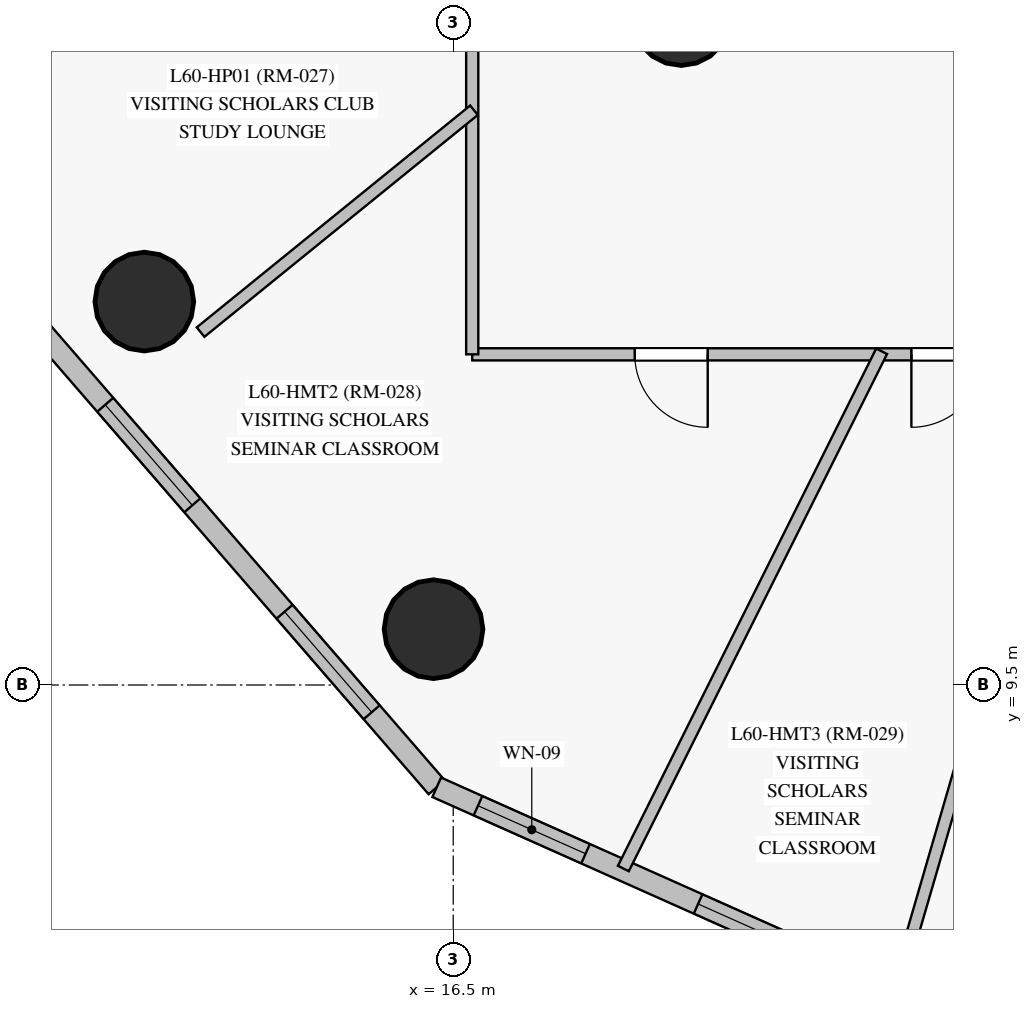
"""IFC4 building model, lengths in metres.
Left out: names, types, materials, properties, quantities, classifications, styles, units other than length and angle.
Written with IfcOpenShell. Run it as: python <this file> out.ifc"""

import sys

from ifc_helpers import new_model, si_unit, direction, frame, frame_2d, origin, origin_with_axes, origin_2d, place, context, subcontext, project, spatial, rectangle, circle, extrude, source, transform, mapped, element, fill, save


model = new_model("IFC4")
c1 = context("Model", 3, precision=1e-05, world=origin(), true_north=direction((0.0, 1.0)))
c2 = subcontext(c1, "Body", "Model", "MODEL_VIEW")
j1 = project(units=[si_unit("LENGTHUNIT", "METRE"), si_unit("PLANEANGLEUNIT", "RADIAN")], contexts=[c1])
p1 = place(None, origin())
s1 = spatial("IfcSite", under=j1, at=p1, CompositionType="ELEMENT")
p2 = place(p1, origin())
s2 = spatial("IfcBuilding", under=s1, at=p2, CompositionType="ELEMENT")
p3 = place(p2, frame((0.0, 0.0, 205.35)))
s3 = spatial("IfcBuildingStorey", under=s2, at=p3, CompositionType="ELEMENT", Elevation=205.35)
m1 = source(origin_with_axes(), c2, "Body", "SweptSolid", [
    extrude(circle(Radius=0.65, at=origin_2d()), origin(), (0.0, 0.0, 1.0), 3.05),
])
for number, where, z_axis, x_axis in (
    (1, (19.5, 18.3, 0.0), (0.0, 0.0, 1.0), (1.0, 0.0, 0.0)),
    (2, (12.436, 14.544, 0.0), (0.0, 0.0, 1.0), (1.0, 0.0, 0.0)),
    (3, (16.241, 10.234, 0.0), (0.0, 0.0, 1.0), (1.0, 0.0, 0.0)),
):
    element("IfcColumn", number, at=place(p3, frame(where, z_axis=z_axis, x_axis=x_axis)), inside=s3, PredefinedType="COLUMN", context=c2, shape_type="MappedRepresentation", body=[
        mapped(m1, transform((0.0, 0.0, 0.0), scale=1.0)),
    ])
p4 = place(p3, frame((7.413, 18.389, 0.0), z_axis=(0.0, 0.0, 1.0), x_axis=(0.654908577936, -0.755708114648, 0.0)))
e4 = element("IfcWall", 4, at=p4, inside=s3, PredefinedType="SOLIDWALL", context=c2, shape_type="SweptSolid", body=[
    extrude(rectangle(XDim=13.544, YDim=0.28, at=frame_2d((6.772, 0.0))), origin(), (0.0, 0.0, 1.0), 2.775),
])
p5 = place(p4, frame((0.573, 0.0, 0.85)))
e5 = element("IfcOpeningElement", 5, at=p5, cuts=e4, PredefinedType="OPENING", context=c2, shape_type="SweptSolid", body=[
    extrude(rectangle(XDim=0.95, YDim=1.5, at=frame_2d((0.475, 0.75))), frame((0.0, 0.15, 0.0), z_axis=(0.0, -1.0, 0.0), x_axis=(1.0, 0.0, 0.0)), (0.0, 0.0, 1.0), 0.3),
])
p6 = place(p4, frame((3.282, 0.0, 0.85)))
e6 = element("IfcOpeningElement", 6, at=p6, cuts=e4, PredefinedType="OPENING", context=c2, shape_type="SweptSolid", body=[
    extrude(rectangle(XDim=1.75, YDim=1.65, at=frame_2d((0.875, 0.825))), frame((0.0, 0.15, 0.0), z_axis=(0.0, -1.0, 0.0), x_axis=(1.0, 0.0, 0.0)), (0.0, 0.0, 1.0), 0.3),
])
p7 = place(p4, frame((6.885, 0.0, 0.85)))
e7 = element("IfcOpeningElement", 7, at=p7, cuts=e4, PredefinedType="OPENING", context=c2, shape_type="SweptSolid", body=[
    extrude(rectangle(XDim=1.75, YDim=1.65, at=frame_2d((0.875, 0.825))), frame((0.0, 0.15, 0.0), z_axis=(0.0, -1.0, 0.0), x_axis=(1.0, 0.0, 0.0)), (0.0, 0.0, 1.0), 0.3),
])
p8 = place(p4, frame((10.488, 0.0, 0.85)))
e8 = element("IfcOpeningElement", 8, at=p8, cuts=e4, PredefinedType="OPENING", context=c2, shape_type="SweptSolid", body=[
    extrude(rectangle(XDim=1.75, YDim=1.65, at=frame_2d((0.875, 0.825))), frame((0.0, 0.15, 0.0), z_axis=(0.0, -1.0, 0.0), x_axis=(1.0, 0.0, 0.0)), (0.0, 0.0, 1.0), 0.3),
])
p9 = place(p3, frame((16.283, 8.154, 0.0), z_axis=(0.0, 0.0, 1.0), x_axis=(0.913170676177, -0.407577374459, 0.0)))
e9 = element("IfcWall", 9, at=p9, inside=s3, PredefinedType="SOLIDWALL", context=c2, shape_type="SweptSolid", body=[
    extrude(rectangle(XDim=9.946, YDim=0.28, at=frame_2d((4.973, 0.0))), origin(), (0.0, 0.0, 1.0), 2.775),
])
p10 = place(p9, frame((0.594, 0.0, 0.85)))
e10 = element("IfcOpeningElement", 10, at=p10, cuts=e9, PredefinedType="OPENING", context=c2, shape_type="SweptSolid", body=[
    extrude(rectangle(XDim=1.55, YDim=1.65, at=frame_2d((0.775, 0.825))), frame((0.0, 0.15, 0.0), z_axis=(0.0, -1.0, 0.0), x_axis=(1.0, 0.0, 0.0)), (0.0, 0.0, 1.0), 0.3),
])
p11 = place(p9, frame((3.766, 0.0, 0.85)))
e11 = element("IfcOpeningElement", 11, at=p11, cuts=e9, PredefinedType="OPENING", context=c2, shape_type="SweptSolid", body=[
    extrude(rectangle(XDim=1.75, YDim=1.65, at=frame_2d((0.875, 0.825))), frame((0.0, 0.15, 0.0), z_axis=(0.0, -1.0, 0.0), x_axis=(1.0, 0.0, 0.0)), (0.0, 0.0, 1.0), 0.3),
])
p12 = place(p9, frame((7.369, 0.0, 0.85)))
e12 = element("IfcOpeningElement", 12, at=p12, cuts=e9, PredefinedType="OPENING", context=c2, shape_type="SweptSolid", body=[
    extrude(rectangle(XDim=1.75, YDim=1.65, at=frame_2d((0.875, 0.825))), frame((0.0, 0.15, 0.0), z_axis=(0.0, -1.0, 0.0), x_axis=(1.0, 0.0, 0.0)), (0.0, 0.0, 1.0), 0.3),
])
p13 = place(p3, frame((41.8, 13.85, 0.0), z_axis=(0.0, 0.0, 1.0), x_axis=(-1.0, 0.0, 0.0)))
e13 = element("IfcWall", 13, at=p13, inside=s3, PredefinedType="PARTITIONING", context=c2, shape_type="SweptSolid", body=[
    extrude(rectangle(XDim=25.05, YDim=0.16, at=frame_2d((12.525, 0.0))), origin(), (0.0, 0.0, 1.0), 2.225),
])
p14 = place(p13, frame((1.62, 0.0, 0.0)))
e14 = element("IfcOpeningElement", 14, at=p14, cuts=e13, PredefinedType="OPENING", context=c2, shape_type="SweptSolid", body=[
    extrude(rectangle(XDim=0.96, YDim=2.15, at=frame_2d((0.48, 1.075))), frame((0.0, 0.09, 0.0), z_axis=(0.0, -1.0, 0.0), x_axis=(1.0, 0.0, 0.0)), (0.0, 0.0, 1.0), 0.18),
])
p15 = place(p13, frame((21.952, 0.0, 0.0)))
e15 = element("IfcOpeningElement", 15, at=p15, cuts=e13, PredefinedType="OPENING", context=c2, shape_type="SweptSolid", body=[
    extrude(rectangle(XDim=0.96, YDim=2.15, at=frame_2d((0.48, 1.075))), frame((0.0, 0.09, 0.0), z_axis=(0.0, -1.0, 0.0), x_axis=(1.0, 0.0, 0.0)), (0.0, 0.0, 1.0), 0.18),
])
p16 = place(p13, frame((18.312, 0.0, 0.0)))
e16 = element("IfcOpeningElement", 16, at=p16, cuts=e13, PredefinedType="OPENING", context=c2, shape_type="SweptSolid", body=[
    extrude(rectangle(XDim=0.96, YDim=2.15, at=frame_2d((0.48, 1.075))), frame((0.0, 0.09, 0.0), z_axis=(0.0, -1.0, 0.0), x_axis=(1.0, 0.0, 0.0)), (0.0, 0.0, 1.0), 0.18),
])
p17 = place(p13, frame((15.808, 0.0, 0.0)))
e17 = element("IfcOpeningElement", 17, at=p17, cuts=e13, PredefinedType="OPENING", context=c2, shape_type="SweptSolid", body=[
    extrude(rectangle(XDim=0.96, YDim=2.15, at=frame_2d((0.48, 1.075))), frame((0.0, 0.09, 0.0), z_axis=(0.0, -1.0, 0.0), x_axis=(1.0, 0.0, 0.0)), (0.0, 0.0, 1.0), 0.18),
])
p18 = place(p13, frame((12.79, 0.0, 0.0)))
e18 = element("IfcOpeningElement", 18, at=p18, cuts=e13, PredefinedType="OPENING", context=c2, shape_type="SweptSolid", body=[
    extrude(rectangle(XDim=0.96, YDim=2.15, at=frame_2d((0.48, 1.075))), frame((0.0, 0.09, 0.0), z_axis=(0.0, -1.0, 0.0), x_axis=(1.0, 0.0, 0.0)), (0.0, 0.0, 1.0), 0.18),
])
p19 = place(p13, frame((10.756, 0.0, 0.0)))
e19 = element("IfcOpeningElement", 19, at=p19, cuts=e13, PredefinedType="OPENING", context=c2, shape_type="SweptSolid", body=[
    extrude(rectangle(XDim=0.96, YDim=2.15, at=frame_2d((0.48, 1.075))), frame((0.0, 0.09, 0.0), z_axis=(0.0, -1.0, 0.0), x_axis=(1.0, 0.0, 0.0)), (0.0, 0.0, 1.0), 0.18),
])
p20 = place(p13, frame((8.292, 0.0, 0.0)))
e20 = element("IfcOpeningElement", 20, at=p20, cuts=e13, PredefinedType="OPENING", context=c2, shape_type="SweptSolid", body=[
    extrude(rectangle(XDim=0.96, YDim=2.15, at=frame_2d((0.48, 1.075))), frame((0.0, 0.09, 0.0), z_axis=(0.0, -1.0, 0.0), x_axis=(1.0, 0.0, 0.0)), (0.0, 0.0, 1.0), 0.18),
])
p21 = place(p13, frame((5.788, 0.0, 0.0)))
e21 = element("IfcOpeningElement", 21, at=p21, cuts=e13, PredefinedType="OPENING", context=c2, shape_type="SweptSolid", body=[
    extrude(rectangle(XDim=0.96, YDim=2.15, at=frame_2d((0.48, 1.075))), frame((0.0, 0.09, 0.0), z_axis=(0.0, -1.0, 0.0), x_axis=(1.0, 0.0, 0.0)), (0.0, 0.0, 1.0), 0.18),
])
p22 = place(p3, frame((16.75, 13.85, 0.0), z_axis=(0.0, 0.0, 1.0), x_axis=(0.0, 1.0, 0.0)))
e22 = element("IfcWall", 22, at=p22, inside=s3, PredefinedType="PARTITIONING", context=c2, shape_type="SweptSolid", body=[
    extrude(rectangle(XDim=17.8, YDim=0.16, at=frame_2d((8.9, 0.0))), origin(), (0.0, 0.0, 1.0), 2.325),
])
p23 = place(p22, frame((8.425, 0.0, 0.0)))
e23 = element("IfcOpeningElement", 23, at=p23, cuts=e22, PredefinedType="OPENING", context=c2, shape_type="SweptSolid", body=[
    extrude(rectangle(XDim=0.96, YDim=2.15, at=frame_2d((0.48, 1.075))), frame((0.0, 0.09, 0.0), z_axis=(0.0, -1.0, 0.0), x_axis=(1.0, 0.0, 0.0)), (0.0, 0.0, 1.0), 0.18),
])
p24 = place(p22, frame((5.515, 0.0, 0.0)))
e24 = element("IfcOpeningElement", 24, at=p24, cuts=e22, PredefinedType="OPENING", context=c2, shape_type="SweptSolid", body=[
    extrude(rectangle(XDim=0.96, YDim=2.15, at=frame_2d((0.48, 1.075))), frame((0.0, 0.09, 0.0), z_axis=(0.0, -1.0, 0.0), x_axis=(1.0, 0.0, 0.0)), (0.0, 0.0, 1.0), 0.18),
])
p25 = place(p22, frame((11.185, 0.0, 0.0)))
e25 = element("IfcOpeningElement", 25, at=p25, cuts=e22, PredefinedType="OPENING", context=c2, shape_type="SweptSolid", body=[
    extrude(rectangle(XDim=0.96, YDim=2.15, at=frame_2d((0.48, 1.075))), frame((0.0, 0.09, 0.0), z_axis=(0.0, -1.0, 0.0), x_axis=(1.0, 0.0, 0.0)), (0.0, 0.0, 1.0), 0.18),
])
p26 = place(p3, frame((16.777, 20.811, 0.0), z_axis=(0.0, 0.0, 1.0), x_axis=(-0.897640670671, -0.440728063955, 0.0)))
e26 = element("IfcWall", 26, at=p26, inside=s3, PredefinedType="PARTITIONING", context=c2, shape_type="SweptSolid", body=[
    extrude(rectangle(XDim=8.93, YDim=0.16, at=frame_2d((4.465, 0.0))), origin(), (0.0, 0.0, 1.0), 2.775),
])
p27 = place(p3, frame((24.771, 13.893, 0.0), z_axis=(0.0, 0.0, 1.0), x_axis=(-0.2792141032, -0.960228870934, 0.0)))
e27 = element("IfcWall", 27, at=p27, inside=s3, PredefinedType="PARTITIONING", context=c2, shape_type="SweptSolid", body=[
    extrude(rectangle(XDim=8.757, YDim=0.16, at=frame_2d((4.378, 0.0))), origin(), (0.0, 0.0, 1.0), 2.775),
])
p28 = place(p3, frame((22.136, 13.89, 0.0), z_axis=(0.0, 0.0, 1.0), x_axis=(-0.446751312841, -0.894658183037, 0.0)))
e28 = element("IfcWall", 28, at=p28, inside=s3, PredefinedType="PARTITIONING", context=c2, shape_type="SweptSolid", body=[
    extrude(rectangle(XDim=7.606, YDim=0.16, at=frame_2d((3.803, 0.0))), origin(), (0.0, 0.0, 1.0), 2.775),
])
p29 = place(p3, frame((16.773, 17.062, 0.0), z_axis=(0.0, 0.0, 1.0), x_axis=(-0.776484627318, -0.630136194437, 0.0)))
e29 = element("IfcWall", 29, at=p29, inside=s3, PredefinedType="PARTITIONING", context=c2, shape_type="SweptSolid", body=[
    extrude(rectangle(XDim=4.633, YDim=0.16, at=frame_2d((2.316, 0.0))), origin(), (0.0, 0.0, 1.0), 2.225),
])
m2 = source(origin_with_axes(), c2, "Body", "SweptSolid", [
    extrude(rectangle(XDim=1.75, YDim=1.65, at=frame_2d((0.875, 0.825))), frame((0.0, 0.03, 0.0), z_axis=(0.0, -1.0, 0.0), x_axis=(1.0, 0.0, 0.0)), (0.0, 0.0, 1.0), 0.06),
])
p30 = place(p7, origin())
e30 = element("IfcWindow", 30, at=p30, inside=s3, PartitioningType="SINGLE_PANEL", PredefinedType="WINDOW", context=c2, shape_type="MappedRepresentation", body=[
    mapped(m2, transform((0.0, 0.0, 0.0), scale=1.0)),
])
fill(e7, e30)
p31 = place(p8, origin())
e31 = element("IfcWindow", 31, at=p31, inside=s3, PartitioningType="SINGLE_PANEL", PredefinedType="WINDOW", context=c2, shape_type="MappedRepresentation", body=[
    mapped(m2, transform((0.0, 0.0, 0.0), scale=1.0)),
])
fill(e8, e31)
m3 = source(origin_with_axes(), c2, "Body", "SweptSolid", [
    extrude(rectangle(XDim=1.55, YDim=1.65, at=frame_2d((0.775, 0.825))), frame((0.0, 0.03, 0.0), z_axis=(0.0, -1.0, 0.0), x_axis=(1.0, 0.0, 0.0)), (0.0, 0.0, 1.0), 0.06),
])
p32 = place(p10, origin())
e32 = element("IfcWindow", 32, at=p32, inside=s3, PartitioningType="SINGLE_PANEL", PredefinedType="WINDOW", context=c2, shape_type="MappedRepresentation", body=[
    mapped(m3, transform((0.0, 0.0, 0.0), scale=1.0)),
])
fill(e10, e32)
p33 = place(p11, origin())
e33 = element("IfcWindow", 33, at=p33, inside=s3, PartitioningType="SINGLE_PANEL", PredefinedType="WINDOW", context=c2, shape_type="MappedRepresentation", body=[
    mapped(m2, transform((0.0, 0.0, 0.0), scale=1.0)),
])
fill(e11, e33)
m4 = source(origin_with_axes(), c2, "Body", "SweptSolid", [
    extrude(rectangle(XDim=0.96, YDim=2.15, at=frame_2d((0.48, 1.075))), frame((0.0, 0.025, 0.0), z_axis=(0.0, -1.0, 0.0), x_axis=(1.0, 0.0, 0.0)), (0.0, 0.0, 1.0), 0.05),
])
p34 = place(p15, origin())
e34 = element("IfcDoor", 34, at=p34, inside=s3, OperationType="SINGLE_SWING_LEFT", PredefinedType="DOOR", context=c2, shape_type="MappedRepresentation", body=[
    mapped(m4, transform((0.0, 0.0, 0.0), scale=1.0)),
])
fill(e15, e34)
p35 = place(p16, origin())
e35 = element("IfcDoor", 35, at=p35, inside=s3, OperationType="SINGLE_SWING_RIGHT", PredefinedType="DOOR", context=c2, shape_type="MappedRepresentation", body=[
    mapped(m4, transform((0.0, 0.0, 0.0), scale=1.0)),
])
fill(e16, e35)
save(model, sys.argv[1])
